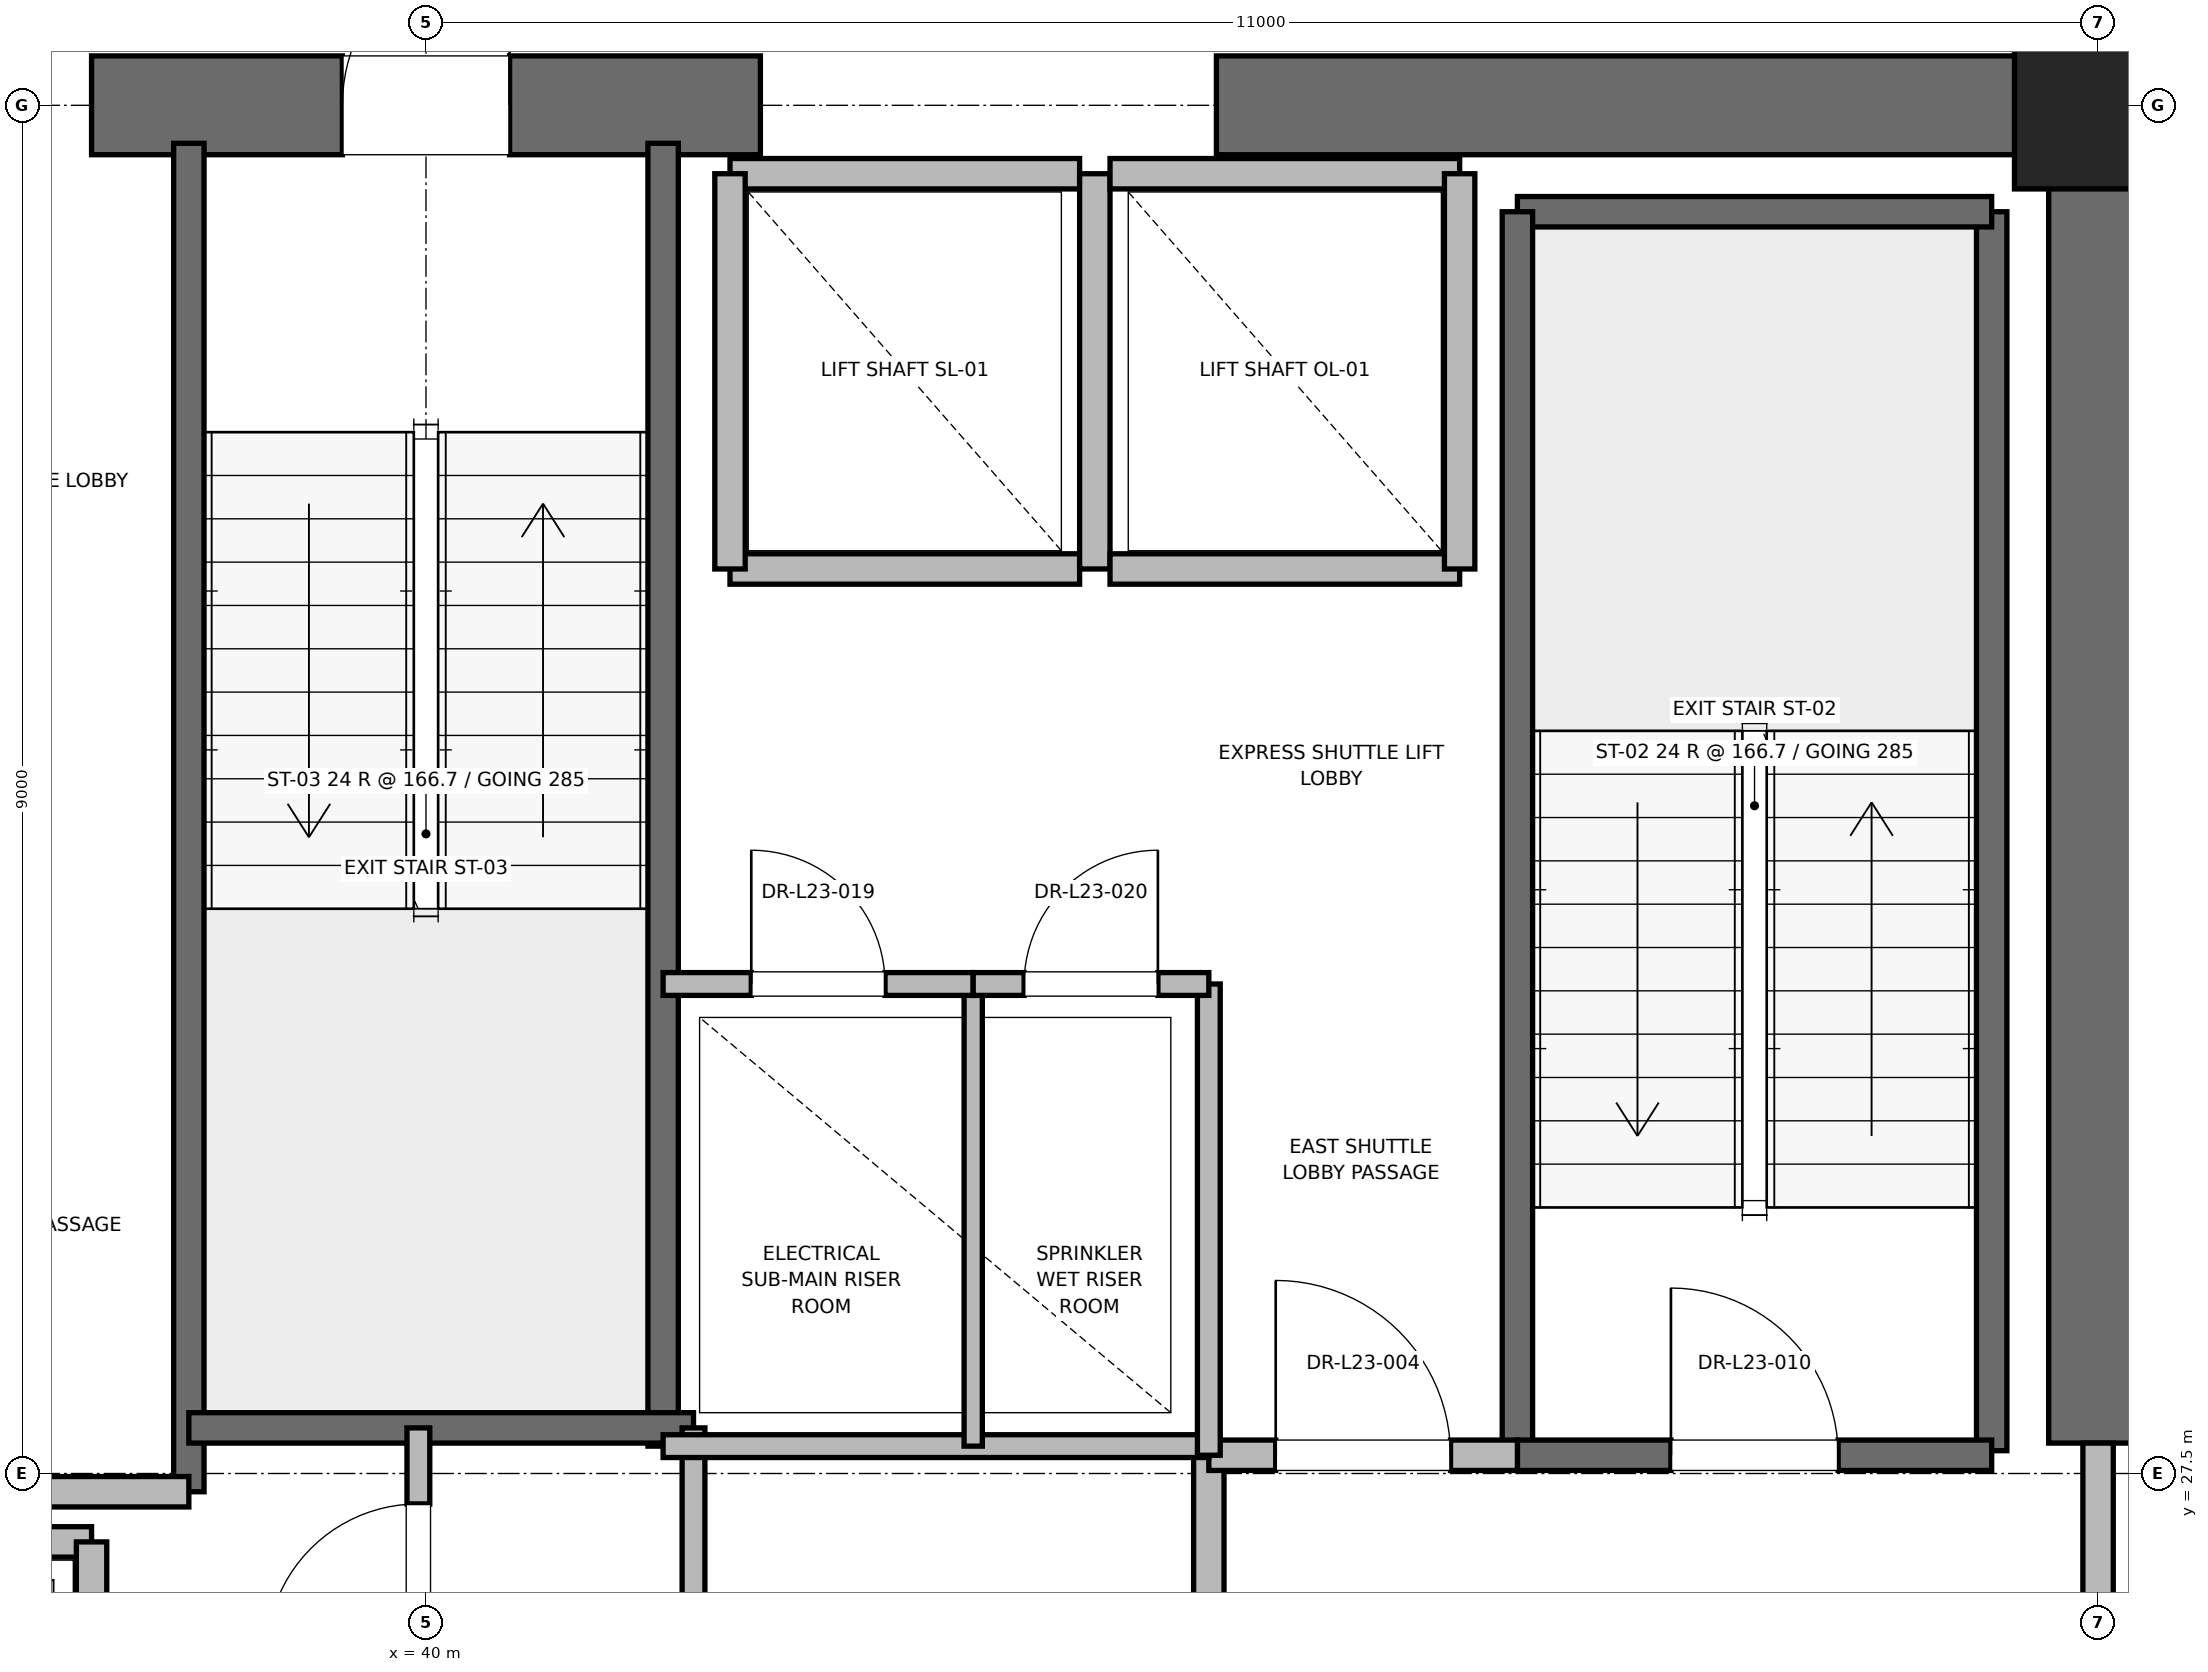
"""IFC4 building model, lengths in metres.
Left out: names, types, materials, properties, quantities, classifications, styles, units other than length and angle.
Written with IfcOpenShell. Run it as: python <this file> out.ifc"""

import sys

from ifc_helpers import new_model, si_unit, direction, frame, frame_2d, origin, origin_2d, place, context, subcontext, project, spatial, rectangle, extrude, element, fill, save


model = new_model("IFC4")
c1 = context("Model", 3, precision=1e-05, world=origin(), true_north=direction((0.0, 1.0)))
c2 = subcontext(c1, "Body", "Model", "MODEL_VIEW")
j1 = project(units=[si_unit("LENGTHUNIT", "METRE"), si_unit("PLANEANGLEUNIT", "RADIAN")], contexts=[c1])
p1 = place(None, origin())
s1 = spatial("IfcSite", under=j1, at=p1, CompositionType="ELEMENT")
p2 = place(p1, origin())
s2 = spatial("IfcBuilding", under=s1, at=p2, CompositionType="ELEMENT")
p3 = place(p2, frame((0.0, 0.0, 99.6)))
s3 = spatial("IfcBuildingStorey", under=s2, at=p3, CompositionType="ELEMENT", Elevation=99.6)
p4 = place(p3, frame((51.0, 36.5, 0.0), z_axis=(0.0, 0.0, 1.0), x_axis=(1.0, 0.0, 0.0)))
e1 = element("IfcColumn", 1, at=p4, inside=s3, PredefinedType="PILASTER", context=c2, shape_type="SweptSolid", body=[
    extrude(rectangle(XDim=1.1, YDim=1.1, at=origin_2d()), origin(), (0.0, 0.0, 1.0), 4.0),
])
p5 = place(p3, frame((37.8, 36.5, 0.0), z_axis=(0.0, 0.0, 1.0), x_axis=(1.0, 0.0, 0.0)))
e2 = element("IfcWall", 2, at=p5, inside=s3, PredefinedType="SHEAR", context=c2, shape_type="SweptSolid", body=[
    extrude(rectangle(XDim=4.4, YDim=0.65, at=frame_2d((2.2, 0.0))), origin(), (0.0, 0.0, 1.0), 3.76),
])
p6 = place(p5, frame((1.65, 0.0, 0.0)))
e3 = element("IfcOpeningElement", 3, at=p6, cuts=e2, PredefinedType="OPENING", context=c2, shape_type="SweptSolid", body=[
    extrude(rectangle(XDim=1.1, YDim=2.15, at=frame_2d((0.55, 1.075))), frame((0.0, 0.325, 0.0), z_axis=(0.0, -1.0, 0.0), x_axis=(1.0, 0.0, 0.0)), (0.0, 0.0, 1.0), 0.65),
])
p7 = place(p3, frame((45.2, 36.5, 0.0), z_axis=(0.0, 0.0, 1.0), x_axis=(1.0, 0.0, 0.0)))
e4 = element("IfcWall", 4, at=p7, inside=s3, PredefinedType="SHEAR", context=c2, shape_type="SweptSolid", body=[
    extrude(rectangle(XDim=5.8, YDim=0.65, at=frame_2d((2.9, 0.0))), origin(), (0.0, 0.0, 1.0), 3.76),
])
p8 = place(p3, frame((51.0, 27.7, 0.0), z_axis=(0.0, 0.0, 1.0), x_axis=(0.0, 1.0, 0.0)))
e5 = element("IfcWall", 5, at=p8, inside=s3, PredefinedType="SHEAR", context=c2, shape_type="SweptSolid", body=[
    extrude(rectangle(XDim=8.8, YDim=0.65, at=frame_2d((4.4, 0.0))), origin(), (0.0, 0.0, 1.0), 3.76),
])
p9 = place(p3, frame((50.3, 27.65, 0.0), z_axis=(0.0, 0.0, 1.0), x_axis=(0.0, 1.0, 0.0)))
e6 = element("IfcWall", 6, at=p9, inside=s3, PredefinedType="SOLIDWALL", context=c2, shape_type="SweptSolid", body=[
    extrude(rectangle(XDim=8.15, YDim=0.2, at=frame_2d((4.075, 0.0))), origin(), (0.0, 0.0, 1.0), 3.76),
])
p10 = place(p3, frame((47.18, 35.8, 0.0), z_axis=(0.0, 0.0, 1.0), x_axis=(1.0, 0.0, 0.0)))
e7 = element("IfcWall", 7, at=p10, inside=s3, PredefinedType="SOLIDWALL", context=c2, shape_type="SweptSolid", body=[
    extrude(rectangle(XDim=3.12, YDim=0.2, at=frame_2d((1.56, 0.0))), origin(), (0.0, 0.0, 1.0), 3.76),
])
p11 = place(p3, frame((47.18, 27.62, 0.0), z_axis=(0.0, 0.0, 1.0), x_axis=(0.0, 1.0, 0.0)))
e8 = element("IfcWall", 8, at=p11, inside=s3, PredefinedType="SOLIDWALL", context=c2, shape_type="SweptSolid", body=[
    extrude(rectangle(XDim=8.18, YDim=0.2, at=frame_2d((4.09, 0.0))), origin(), (0.0, 0.0, 1.0), 3.76),
])
p12 = place(p3, frame((47.18, 27.62, 0.0), z_axis=(0.0, 0.0, 1.0), x_axis=(1.0, 0.0, 0.0)))
e9 = element("IfcWall", 9, at=p12, inside=s3, PredefinedType="SOLIDWALL", context=c2, shape_type="SweptSolid", body=[
    extrude(rectangle(XDim=3.12, YDim=0.2, at=frame_2d((1.56, 0.0))), origin(), (0.0, 0.0, 1.0), 3.76),
])
p13 = place(p12, frame((1.01, 0.0, 0.0)))
e10 = element("IfcOpeningElement", 10, at=p13, cuts=e9, PredefinedType="OPENING", context=c2, shape_type="SweptSolid", body=[
    extrude(rectangle(XDim=1.1, YDim=2.15, at=frame_2d((0.55, 1.075))), frame((0.0, 0.1, 0.0), z_axis=(0.0, -1.0, 0.0), x_axis=(1.0, 0.0, 0.0)), (0.0, 0.0, 1.0), 0.2),
])
p14 = place(p3, frame((38.44, 27.38, 0.0), z_axis=(0.0, 0.0, 1.0), x_axis=(0.0, 1.0, 0.0)))
e11 = element("IfcWall", 11, at=p14, inside=s3, PredefinedType="SOLIDWALL", context=c2, shape_type="SweptSolid", body=[
    extrude(rectangle(XDim=8.87, YDim=0.2, at=frame_2d((4.435, 0.0))), origin(), (0.0, 0.0, 1.0), 3.76),
])
p15 = place(p3, frame((41.56, 27.68, 0.0), z_axis=(0.0, 0.0, 1.0), x_axis=(0.0, 1.0, 0.0)))
e12 = element("IfcWall", 12, at=p15, inside=s3, PredefinedType="SOLIDWALL", context=c2, shape_type="SweptSolid", body=[
    extrude(rectangle(XDim=8.57, YDim=0.2, at=frame_2d((4.285, 0.0))), origin(), (0.0, 0.0, 1.0), 3.76),
])
p16 = place(p3, frame((38.44, 27.8, 0.0), z_axis=(0.0, 0.0, 1.0), x_axis=(1.0, 0.0, 0.0)))
e13 = element("IfcWall", 13, at=p16, inside=s3, PredefinedType="SOLIDWALL", context=c2, shape_type="SweptSolid", body=[
    extrude(rectangle(XDim=3.32, YDim=0.2, at=frame_2d((1.66, 0.0))), origin(), (0.0, 0.0, 1.0), 3.76),
])
p17 = place(p3, frame((32.82, 27.38, 0.0), z_axis=(0.0, 0.0, 1.0), x_axis=(1.0, 0.0, 0.0)))
e14 = element("IfcWall", 14, at=p17, inside=s3, PredefinedType="PARTITIONING", context=c2, shape_type="SweptSolid", body=[
    extrude(rectangle(XDim=5.62, YDim=0.2, at=frame_2d((2.81, 0.0))), origin(), (0.0, 0.0, 1.0), 3.76),
])
p18 = place(p3, frame((45.15, 24.25, 0.0), z_axis=(0.0, 0.0, 1.0), x_axis=(0.0, 1.0, 0.0)))
e15 = element("IfcWall", 15, at=p18, inside=s3, PredefinedType="PARTITIONING", context=c2, shape_type="SweptSolid", body=[
    extrude(rectangle(XDim=3.37, YDim=0.2, at=frame_2d((1.685, 0.0))), origin(), (0.0, 0.0, 1.0), 3.76),
])
p19 = place(p3, frame((45.15, 27.62, 0.0), z_axis=(0.0, 0.0, 1.0), x_axis=(1.0, 0.0, 0.0)))
e16 = element("IfcWall", 16, at=p19, inside=s3, PredefinedType="PARTITIONING", context=c2, shape_type="SweptSolid", body=[
    extrude(rectangle(XDim=2.03, YDim=0.2, at=frame_2d((1.015, 0.0))), origin(), (0.0, 0.0, 1.0), 3.76),
])
p20 = place(p19, frame((0.44, 0.0, 0.0)))
e17 = element("IfcOpeningElement", 17, at=p20, cuts=e16, PredefinedType="OPENING", context=c2, shape_type="SweptSolid", body=[
    extrude(rectangle(XDim=1.15, YDim=2.2, at=frame_2d((0.575, 1.1))), frame((0.0, 0.1, 0.0), z_axis=(0.0, -1.0, 0.0), x_axis=(1.0, 0.0, 0.0)), (0.0, 0.0, 1.0), 0.2),
])
p21 = place(p3, frame((51.0, 24.3, 0.0), z_axis=(0.0, 0.0, 1.0), x_axis=(0.0, 1.0, 0.0)))
e18 = element("IfcWall", 18, at=p21, inside=s3, PredefinedType="PARTITIONING", context=c2, shape_type="SweptSolid", body=[
    extrude(rectangle(XDim=3.4, YDim=0.2, at=frame_2d((1.7, 0.0))), origin(), (0.0, 0.0, 1.0), 2.54),
])
p22 = place(p21, frame((1.125, 0.0, 0.0)))
e19 = element("IfcOpeningElement", 19, at=p22, cuts=e18, PredefinedType="OPENING", context=c2, shape_type="SweptSolid", body=[
    extrude(rectangle(XDim=1.15, YDim=2.2, at=frame_2d((0.575, 1.1))), frame((0.0, 0.1, 0.0), z_axis=(0.0, -1.0, 0.0), x_axis=(1.0, 0.0, 0.0)), (0.0, 0.0, 1.0), 0.2),
])
p23 = place(p3, frame((37.8, 27.05, 0.0), z_axis=(0.0, 0.0, 1.0), x_axis=(-1.0, 0.0, 0.0)))
e20 = element("IfcWall", 20, at=p23, inside=s3, PredefinedType="SOLIDWALL", context=c2, shape_type="SweptSolid", body=[
    extrude(rectangle(XDim=2.3, YDim=0.2, at=frame_2d((1.15, 0.0))), origin(), (0.0, 0.0, 1.0), 3.76),
])
p24 = place(p3, frame((37.8, 24.45, 0.0), z_axis=(0.0, 0.0, 1.0), x_axis=(0.0, 1.0, 0.0)))
e21 = element("IfcWall", 21, at=p24, inside=s3, PredefinedType="SOLIDWALL", context=c2, shape_type="SweptSolid", body=[
    extrude(rectangle(XDim=2.6, YDim=0.2, at=frame_2d((1.3, 0.0))), origin(), (0.0, 0.0, 1.0), 3.76),
])
p25 = place(p3, frame((42.0, 33.45, 0.0), z_axis=(0.0, 0.0, 1.0), x_axis=(1.0, 0.0, 0.0)))
e22 = element("IfcWall", 22, at=p25, inside=s3, PredefinedType="SOLIDWALL", context=c2, shape_type="SweptSolid", body=[
    extrude(rectangle(XDim=2.3, YDim=0.2, at=frame_2d((1.15, 0.0))), origin(), (0.0, 0.0, 1.0), 3.76),
])
p26 = place(p3, frame((44.3, 36.05, 0.0), z_axis=(0.0, 0.0, 1.0), x_axis=(-1.0, 0.0, 0.0)))
e23 = element("IfcWall", 23, at=p26, inside=s3, PredefinedType="SOLIDWALL", context=c2, shape_type="SweptSolid", body=[
    extrude(rectangle(XDim=2.3, YDim=0.2, at=frame_2d((1.15, 0.0))), origin(), (0.0, 0.0, 1.0), 2.54),
])
for number, where, z_axis, x_axis in (
    (24, (42.0, 36.05, 0.0), (0.0, 0.0, 1.0), (0.0, -1.0, 0.0)),
    (25, (44.4, 33.45, 0.0), (0.0, 0.0, 1.0), (0.0, 1.0, 0.0)),
):
    element("IfcWall", number, at=place(p3, frame(where, z_axis=z_axis, x_axis=x_axis)), inside=s3, PredefinedType="SOLIDWALL", context=c2, shape_type="SweptSolid", body=[
        extrude(rectangle(XDim=2.6, YDim=0.2, at=frame_2d((1.3, 0.0))), origin(), (0.0, 0.0, 1.0), 2.54),
    ])
p27 = place(p3, frame((44.5, 33.45, 0.0), z_axis=(0.0, 0.0, 1.0), x_axis=(1.0, 0.0, 0.0)))
e26 = element("IfcWall", 26, at=p27, inside=s3, PredefinedType="SOLIDWALL", context=c2, shape_type="SweptSolid", body=[
    extrude(rectangle(XDim=2.3, YDim=0.2, at=frame_2d((1.15, 0.0))), origin(), (0.0, 0.0, 1.0), 3.76),
])
p28 = place(p3, frame((46.8, 36.05, 0.0), z_axis=(0.0, 0.0, 1.0), x_axis=(-1.0, 0.0, 0.0)))
e27 = element("IfcWall", 27, at=p28, inside=s3, PredefinedType="SOLIDWALL", context=c2, shape_type="SweptSolid", body=[
    extrude(rectangle(XDim=2.3, YDim=0.2, at=frame_2d((1.15, 0.0))), origin(), (0.0, 0.0, 1.0), 2.54),
])
p29 = place(p3, frame((46.8, 33.45, 0.0), z_axis=(0.0, 0.0, 1.0), x_axis=(0.0, 1.0, 0.0)))
e28 = element("IfcWall", 28, at=p29, inside=s3, PredefinedType="SOLIDWALL", context=c2, shape_type="SweptSolid", body=[
    extrude(rectangle(XDim=2.6, YDim=0.2, at=frame_2d((1.3, 0.0))), origin(), (0.0, 0.0, 1.0), 3.76),
])
p30 = place(p3, frame((41.76, 23.8, 0.0), z_axis=(0.0, 0.0, 1.0), x_axis=(0.0, 1.0, 0.0)))
e29 = element("IfcWall", 29, at=p30, inside=s3, PredefinedType="PARTITIONING", context=c2, shape_type="SweptSolid", body=[
    extrude(rectangle(XDim=4.0, YDim=0.15, at=frame_2d((2.0, 0.0))), origin(), (0.0, 0.0, 1.0), 2.85),
])
p31 = place(p3, frame((39.95, 25.8, 0.0), z_axis=(0.0, 0.0, 1.0), x_axis=(0.0, 1.0, 0.0)))
e30 = element("IfcWall", 30, at=p31, inside=s3, PredefinedType="PARTITIONING", context=c2, shape_type="SweptSolid", body=[
    extrude(rectangle(XDim=2.0, YDim=0.15, at=frame_2d((1.0, 0.0))), origin(), (0.0, 0.0, 1.0), 2.85),
])
p32 = place(p31, frame((0.5, 0.0, 0.0)))
e31 = element("IfcOpeningElement", 31, at=p32, cuts=e30, PredefinedType="OPENING", context=c2, shape_type="SweptSolid", body=[
    extrude(rectangle(XDim=1.0, YDim=2.15, at=frame_2d((0.5, 1.075))), frame((0.0, 0.075, 0.0), z_axis=(0.0, -1.0, 0.0), x_axis=(1.0, 0.0, 0.0)), (0.0, 0.0, 1.0), 0.15),
])
p33 = place(p3, frame((41.56, 27.68, 0.0), z_axis=(0.0, 0.0, 1.0), x_axis=(1.0, 0.0, 0.0)))
e32 = element("IfcWall", 32, at=p33, inside=s3, PredefinedType="PARTITIONING", context=c2, shape_type="SweptSolid", body=[
    extrude(rectangle(XDim=3.59, YDim=0.15, at=frame_2d((1.795, 0.0))), origin(), (0.0, 0.0, 1.0), 2.85),
])
p34 = place(p3, frame((45.15, 27.62, 0.0), z_axis=(0.0, 0.0, 1.0), x_axis=(0.0, 1.0, 0.0)))
e33 = element("IfcWall", 33, at=p34, inside=s3, PredefinedType="PARTITIONING", context=c2, shape_type="SweptSolid", body=[
    extrude(rectangle(XDim=3.1, YDim=0.15, at=frame_2d((1.55, 0.0))), origin(), (0.0, 0.0, 1.0), 2.85),
])
p35 = place(p3, frame((43.6, 27.68, 0.0), z_axis=(0.0, 0.0, 1.0), x_axis=(0.0, 1.0, 0.0)))
e34 = element("IfcWall", 34, at=p35, inside=s3, PredefinedType="PARTITIONING", context=c2, shape_type="SweptSolid", body=[
    extrude(rectangle(XDim=3.04, YDim=0.12, at=frame_2d((1.52, 0.0))), origin(), (0.0, 0.0, 1.0), 2.85),
])
p36 = place(p3, frame((41.56, 30.72, 0.0), z_axis=(0.0, 0.0, 1.0), x_axis=(1.0, 0.0, 0.0)))
e35 = element("IfcWall", 35, at=p36, inside=s3, PredefinedType="PARTITIONING", context=c2, shape_type="SweptSolid", body=[
    extrude(rectangle(XDim=2.04, YDim=0.15, at=frame_2d((1.02, 0.0))), origin(), (0.0, 0.0, 1.0), 2.85),
])
p37 = place(p36, frame((0.58, 0.0, 0.0)))
e36 = element("IfcOpeningElement", 36, at=p37, cuts=e35, PredefinedType="OPENING", context=c2, shape_type="SweptSolid", body=[
    extrude(rectangle(XDim=0.88, YDim=2.1, at=frame_2d((0.44, 1.05))), frame((0.0, 0.075, 0.0), z_axis=(0.0, -1.0, 0.0), x_axis=(1.0, 0.0, 0.0)), (0.0, 0.0, 1.0), 0.15),
])
p38 = place(p3, frame((43.6, 30.72, 0.0), z_axis=(0.0, 0.0, 1.0), x_axis=(1.0, 0.0, 0.0)))
e37 = element("IfcWall", 37, at=p38, inside=s3, PredefinedType="PARTITIONING", context=c2, shape_type="SweptSolid", body=[
    extrude(rectangle(XDim=1.55, YDim=0.15, at=frame_2d((0.775, 0.0))), origin(), (0.0, 0.0, 1.0), 2.85),
])
p39 = place(p38, frame((0.335, 0.0, 0.0)))
e38 = element("IfcOpeningElement", 38, at=p39, cuts=e37, PredefinedType="OPENING", context=c2, shape_type="SweptSolid", body=[
    extrude(rectangle(XDim=0.88, YDim=2.1, at=frame_2d((0.44, 1.05))), frame((0.0, 0.075, 0.0), z_axis=(0.0, -1.0, 0.0), x_axis=(1.0, 0.0, 0.0)), (0.0, 0.0, 1.0), 0.15),
])
p40 = place(p13, origin())
e39 = element("IfcDoor", 39, at=p40, inside=s3, OperationType="SINGLE_SWING_LEFT", PredefinedType="DOOR", context=c2, shape_type="SweptSolid", body=[
    extrude(rectangle(XDim=1.1, YDim=2.15, at=frame_2d((0.55, 1.075))), frame((0.0, 0.025, 0.0), z_axis=(0.0, -1.0, 0.0), x_axis=(1.0, 0.0, 0.0)), (0.0, 0.0, 1.0), 0.05),
])
fill(e10, e39)
p41 = place(p6, origin())
e40 = element("IfcDoor", 40, at=p41, inside=s3, OperationType="SINGLE_SWING_RIGHT", PredefinedType="DOOR", context=c2, shape_type="SweptSolid", body=[
    extrude(rectangle(XDim=1.1, YDim=2.15, at=frame_2d((0.55, 1.075))), frame((0.0, 0.025, 0.0), z_axis=(0.0, -1.0, 0.0), x_axis=(1.0, 0.0, 0.0)), (0.0, 0.0, 1.0), 0.05),
])
fill(e3, e40)
p42 = place(p20, origin())
e41 = element("IfcDoor", 41, at=p42, inside=s3, OperationType="SINGLE_SWING_LEFT", PredefinedType="DOOR", context=c2, shape_type="SweptSolid", body=[
    extrude(rectangle(XDim=1.15, YDim=2.2, at=frame_2d((0.575, 1.1))), frame((0.0, 0.025, 0.0), z_axis=(0.0, -1.0, 0.0), x_axis=(1.0, 0.0, 0.0)), (0.0, 0.0, 1.0), 0.05),
])
fill(e17, e41)
p43 = place(p32, origin())
e42 = element("IfcDoor", 42, at=p43, inside=s3, OperationType="SINGLE_SWING_LEFT", PredefinedType="DOOR", context=c2, shape_type="SweptSolid", body=[
    extrude(rectangle(XDim=1.0, YDim=2.15, at=frame_2d((0.5, 1.075))), frame((0.0, 0.025, 0.0), z_axis=(0.0, -1.0, 0.0), x_axis=(1.0, 0.0, 0.0)), (0.0, 0.0, 1.0), 0.05),
])
fill(e31, e42)
p44 = place(p37, origin())
e43 = element("IfcDoor", 43, at=p44, inside=s3, OperationType="SINGLE_SWING_LEFT", PredefinedType="DOOR", context=c2, shape_type="SweptSolid", body=[
    extrude(rectangle(XDim=0.88, YDim=2.1, at=frame_2d((0.44, 1.05))), frame((0.0, 0.025, 0.0), z_axis=(0.0, -1.0, 0.0), x_axis=(1.0, 0.0, 0.0)), (0.0, 0.0, 1.0), 0.05),
])
fill(e36, e43)
p45 = place(p39, origin())
e44 = element("IfcDoor", 44, at=p45, inside=s3, OperationType="SINGLE_SWING_RIGHT", PredefinedType="DOOR", context=c2, shape_type="SweptSolid", body=[
    extrude(rectangle(XDim=0.88, YDim=2.1, at=frame_2d((0.44, 1.05))), frame((0.0, 0.025, 0.0), z_axis=(0.0, -1.0, 0.0), x_axis=(1.0, 0.0, 0.0)), (0.0, 0.0, 1.0), 0.05),
])
fill(e38, e44)
save(model, sys.argv[1])
